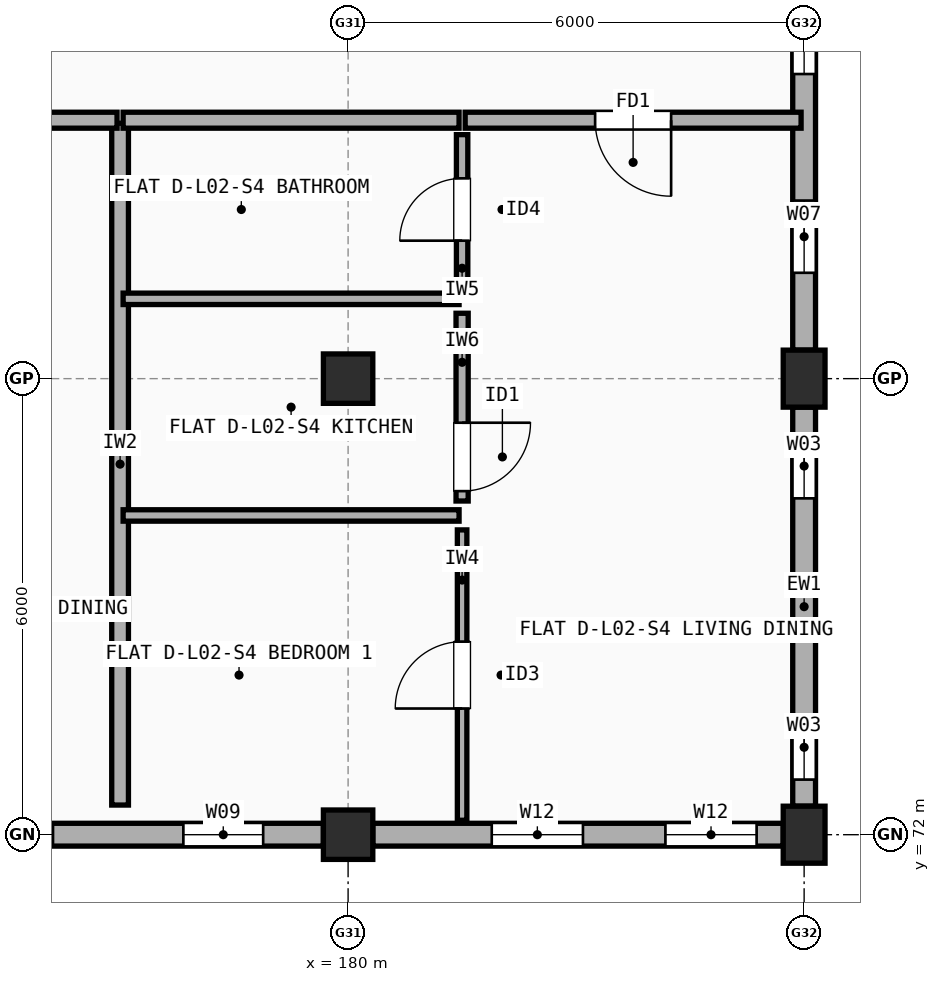
"""IFC4 building model, lengths in metres.
Left out: names, types, materials, properties, quantities, classifications, styles, units other than length and angle.
Written with IfcOpenShell. Run it as: python <this file> out.ifc"""

import sys

from ifc_helpers import new_model, si_unit, direction, frame, frame_2d, origin, origin_2d, place, context, subcontext, project, spatial, rectangle, extrude, element, fill, save


model = new_model("IFC4")
c1 = context("Model", 3, precision=1e-05, world=origin(), true_north=direction((0.0, 1.0)))
c2 = subcontext(c1, "Body", "Model", "MODEL_VIEW")
j1 = project(units=[si_unit("LENGTHUNIT", "METRE"), si_unit("PLANEANGLEUNIT", "RADIAN")], contexts=[c1])
p1 = place(None, origin())
s1 = spatial("IfcSite", under=j1, at=p1, CompositionType="ELEMENT")
p2 = place(p1, origin())
s2 = spatial("IfcBuilding", under=s1, at=p2, CompositionType="ELEMENT")
p3 = place(p2, frame((0.0, 0.0, 7.7)))
s3 = spatial("IfcBuildingStorey", under=s2, at=p3, CompositionType="ELEMENT", Elevation=7.7)
for number, where, z_axis, x_axis in (
    (1, (180.0, 72.0, 0.0), (0.0, 0.0, 1.0), (1.0, 0.0, 0.0)),
    (2, (180.0, 78.0, 0.0), (0.0, 0.0, 1.0), (1.0, 0.0, 0.0)),
):
    element("IfcColumn", number, at=place(p3, frame(where, z_axis=z_axis, x_axis=x_axis)), inside=s3, PredefinedType="COLUMN", context=c2, shape_type="SweptSolid", body=[
        extrude(rectangle(XDim=0.65, YDim=0.65, at=origin_2d()), origin(), (0.0, 0.0, 1.0), 2.955),
    ])
for number, where, z_axis, x_axis in (
    (3, (186.0, 72.0, 0.0), (0.0, 0.0, 1.0), (1.0, 0.0, 0.0)),
    (4, (186.0, 78.0, 0.0), (0.0, 0.0, 1.0), (1.0, 0.0, 0.0)),
):
    element("IfcColumn", number, at=place(p3, frame(where, z_axis=z_axis, x_axis=x_axis)), inside=s3, PredefinedType="COLUMN", context=c2, shape_type="SweptSolid", body=[
        extrude(rectangle(XDim=0.55, YDim=0.75, at=origin_2d()), origin(), (0.0, 0.0, 1.0), 2.955),
    ])
p4 = place(p3, frame((174.325, 72.0, 0.0), z_axis=(0.0, 0.0, 1.0), x_axis=(1.0, 0.0, 0.0)))
e5 = element("IfcWall", 5, at=p4, inside=s3, PredefinedType="STANDARD", context=c2, shape_type="SweptSolid", body=[
    extrude(rectangle(XDim=5.35, YDim=0.3, at=frame_2d((2.675, 0.0))), origin(), (0.0, 0.0, 1.0), 2.437),
])
p5 = place(p4, frame((0.843, 0.0, 0.9)))
e6 = element("IfcOpeningElement", 6, at=p5, cuts=e5, PredefinedType="OPENING", context=c2, shape_type="SweptSolid", body=[
    extrude(rectangle(XDim=0.95, YDim=1.35, at=frame_2d((0.475, 0.675))), frame((0.0, 0.16, 0.0), z_axis=(0.0, -1.0, 0.0), x_axis=(1.0, 0.0, 0.0)), (0.0, 0.0, 1.0), 0.32),
])
p6 = place(p4, frame((3.508, 0.0, 0.9)))
e7 = element("IfcOpeningElement", 7, at=p6, cuts=e5, PredefinedType="OPENING", context=c2, shape_type="SweptSolid", body=[
    extrude(rectangle(XDim=1.05, YDim=1.35, at=frame_2d((0.525, 0.675))), frame((0.0, 0.16, 0.0), z_axis=(0.0, -1.0, 0.0), x_axis=(1.0, 0.0, 0.0)), (0.0, 0.0, 1.0), 0.32),
])
p7 = place(p3, frame((180.325, 72.0, 0.0), z_axis=(0.0, 0.0, 1.0), x_axis=(1.0, 0.0, 0.0)))
e8 = element("IfcWall", 8, at=p7, inside=s3, PredefinedType="STANDARD", context=c2, shape_type="SweptSolid", body=[
    extrude(rectangle(XDim=5.4, YDim=0.3, at=frame_2d((2.7, 0.0))), origin(), (0.0, 0.0, 1.0), 2.437),
])
p8 = place(p7, frame((1.565, 0.0, 0.9)))
e9 = element("IfcOpeningElement", 9, at=p8, cuts=e8, PredefinedType="OPENING", context=c2, shape_type="SweptSolid", body=[
    extrude(rectangle(XDim=1.2, YDim=1.35, at=frame_2d((0.6, 0.675))), frame((0.0, 0.16, 0.0), z_axis=(0.0, -1.0, 0.0), x_axis=(1.0, 0.0, 0.0)), (0.0, 0.0, 1.0), 0.32),
])
p9 = place(p7, frame((3.85, 0.0, 0.9)))
e10 = element("IfcOpeningElement", 10, at=p9, cuts=e8, PredefinedType="OPENING", context=c2, shape_type="SweptSolid", body=[
    extrude(rectangle(XDim=1.2, YDim=1.35, at=frame_2d((0.6, 0.675))), frame((0.0, 0.16, 0.0), z_axis=(0.0, -1.0, 0.0), x_axis=(1.0, 0.0, 0.0)), (0.0, 0.0, 1.0), 0.32),
])
p10 = place(p3, frame((186.0, 72.375, 0.0), z_axis=(0.0, 0.0, 1.0), x_axis=(0.0, 1.0, 0.0)))
e11 = element("IfcWall", 11, at=p10, inside=s3, PredefinedType="STANDARD", context=c2, shape_type="SweptSolid", body=[
    extrude(rectangle(XDim=5.25, YDim=0.3, at=frame_2d((2.625, 0.0))), origin(), (0.0, 0.0, 1.0), 2.437),
])
p11 = place(p10, frame((0.35, 0.0, 0.9)))
e12 = element("IfcOpeningElement", 12, at=p11, cuts=e11, PredefinedType="OPENING", context=c2, shape_type="SweptSolid", body=[
    extrude(rectangle(XDim=0.85, YDim=1.25, at=frame_2d((0.425, 0.625))), frame((0.0, 0.16, 0.0), z_axis=(0.0, -1.0, 0.0), x_axis=(1.0, 0.0, 0.0)), (0.0, 0.0, 1.0), 0.32),
])
p12 = place(p10, frame((4.05, 0.0, 0.9)))
e13 = element("IfcOpeningElement", 13, at=p12, cuts=e11, PredefinedType="OPENING", context=c2, shape_type="SweptSolid", body=[
    extrude(rectangle(XDim=0.85, YDim=1.25, at=frame_2d((0.425, 0.625))), frame((0.0, 0.16, 0.0), z_axis=(0.0, -1.0, 0.0), x_axis=(1.0, 0.0, 0.0)), (0.0, 0.0, 1.0), 0.32),
])
p13 = place(p3, frame((186.0, 78.375, 0.0), z_axis=(0.0, 0.0, 1.0), x_axis=(0.0, 1.0, 0.0)))
e14 = element("IfcWall", 14, at=p13, inside=s3, PredefinedType="STANDARD", context=c2, shape_type="SweptSolid", body=[
    extrude(rectangle(XDim=5.25, YDim=0.3, at=frame_2d((2.625, 0.0))), origin(), (0.0, 0.0, 1.0), 2.437),
])
p14 = place(p13, frame((1.018, 0.0, 0.9)))
e15 = element("IfcOpeningElement", 15, at=p14, cuts=e14, PredefinedType="OPENING", context=c2, shape_type="SweptSolid", body=[
    extrude(rectangle(XDim=0.95, YDim=1.35, at=frame_2d((0.475, 0.675))), frame((0.0, 0.16, 0.0), z_axis=(0.0, -1.0, 0.0), x_axis=(1.0, 0.0, 0.0)), (0.0, 0.0, 1.0), 0.32),
])
p15 = place(p13, frame((3.633, 0.0, 0.9)))
e16 = element("IfcOpeningElement", 16, at=p15, cuts=e14, PredefinedType="OPENING", context=c2, shape_type="SweptSolid", body=[
    extrude(rectangle(XDim=1.05, YDim=1.35, at=frame_2d((0.525, 0.675))), frame((0.0, 0.16, 0.0), z_axis=(0.0, -1.0, 0.0), x_axis=(1.0, 0.0, 0.0)), (0.0, 0.0, 1.0), 0.32),
])
p16 = place(p3, frame((177.0, 72.39, 0.0), z_axis=(0.0, 0.0, 1.0), x_axis=(0.0, 1.0, 0.0)))
e17 = element("IfcWall", 17, at=p16, inside=s3, PredefinedType="SOLIDWALL", context=c2, shape_type="SweptSolid", body=[
    extrude(rectangle(XDim=8.97, YDim=0.22, at=frame_2d((4.485, 0.0))), origin(), (0.0, 0.0, 1.0), 2.437),
])
p17 = place(p3, frame((172.54, 81.4, 0.0), z_axis=(0.0, 0.0, 1.0), x_axis=(1.0, 0.0, 0.0)))
e18 = element("IfcWall", 18, at=p17, inside=s3, PredefinedType="SOLIDWALL", context=c2, shape_type="SweptSolid", body=[
    extrude(rectangle(XDim=4.42, YDim=0.21, at=frame_2d((2.21, 0.0))), origin(), (0.0, 0.0, 1.0), 2.337),
])
p18 = place(p17, frame((1.685, 0.0, 0.0)))
e19 = element("IfcOpeningElement", 19, at=p18, cuts=e18, PredefinedType="OPENING", context=c2, shape_type="SweptSolid", body=[
    extrude(rectangle(XDim=1.05, YDim=2.15, at=frame_2d((0.525, 1.075))), frame((0.0, 0.115, 0.0), z_axis=(0.0, -1.0, 0.0), x_axis=(1.0, 0.0, 0.0)), (0.0, 0.0, 1.0), 0.23),
])
p19 = place(p3, frame((177.04, 81.4, 0.0), z_axis=(0.0, 0.0, 1.0), x_axis=(1.0, 0.0, 0.0)))
e20 = element("IfcWall", 20, at=p19, inside=s3, PredefinedType="SOLIDWALL", context=c2, shape_type="SweptSolid", body=[
    extrude(rectangle(XDim=4.42, YDim=0.21, at=frame_2d((2.21, 0.0))), origin(), (0.0, 0.0, 1.0), 2.337),
])
p20 = place(p3, frame((181.54, 81.4, 0.0), z_axis=(0.0, 0.0, 1.0), x_axis=(1.0, 0.0, 0.0)))
e21 = element("IfcWall", 21, at=p20, inside=s3, PredefinedType="SOLIDWALL", context=c2, shape_type="SweptSolid", body=[
    extrude(rectangle(XDim=4.42, YDim=0.21, at=frame_2d((2.21, 0.0))), origin(), (0.0, 0.0, 1.0), 2.437),
])
p21 = place(p20, frame((1.71, 0.0, 0.0)))
e22 = element("IfcOpeningElement", 22, at=p21, cuts=e21, PredefinedType="OPENING", context=c2, shape_type="SweptSolid", body=[
    extrude(rectangle(XDim=1.0, YDim=2.15, at=frame_2d((0.5, 1.075))), frame((0.0, 0.115, 0.0), z_axis=(0.0, -1.0, 0.0), x_axis=(1.0, 0.0, 0.0)), (0.0, 0.0, 1.0), 0.23),
])
p22 = place(p3, frame((181.5, 72.19, 0.0), z_axis=(0.0, 0.0, 1.0), x_axis=(0.0, 1.0, 0.0)))
e23 = element("IfcWall", 23, at=p22, inside=s3, PredefinedType="PARTITIONING", context=c2, shape_type="SweptSolid", body=[
    extrude(rectangle(XDim=3.82, YDim=0.125, at=frame_2d((1.91, 0.0))), origin(), (0.0, 0.0, 1.0), 2.955),
])
p23 = place(p22, frame((1.47, 0.0, 0.0)))
e24 = element("IfcOpeningElement", 24, at=p23, cuts=e23, PredefinedType="OPENING", context=c2, shape_type="SweptSolid", body=[
    extrude(rectangle(XDim=0.88, YDim=2.1, at=frame_2d((0.44, 1.05))), frame((0.0, 0.073, 0.0), z_axis=(0.0, -1.0, 0.0), x_axis=(1.0, 0.0, 0.0)), (0.0, 0.0, 1.0), 0.145),
])
p24 = place(p3, frame((181.5, 76.39, 0.0), z_axis=(0.0, 0.0, 1.0), x_axis=(0.0, 1.0, 0.0)))
e25 = element("IfcWall", 25, at=p24, inside=s3, PredefinedType="PLUMBINGWALL", context=c2, shape_type="SweptSolid", body=[
    extrude(rectangle(XDim=2.47, YDim=0.16, at=frame_2d((1.235, 0.0))), origin(), (0.0, 0.0, 1.0), 2.437),
])
p25 = place(p24, frame((0.13, 0.0, 0.0)))
e26 = element("IfcOpeningElement", 26, at=p25, cuts=e25, PredefinedType="OPENING", context=c2, shape_type="SweptSolid", body=[
    extrude(rectangle(XDim=0.9, YDim=2.1, at=frame_2d((0.45, 1.05))), frame((0.0, 0.09, 0.0), z_axis=(0.0, -1.0, 0.0), x_axis=(1.0, 0.0, 0.0)), (0.0, 0.0, 1.0), 0.18),
])
p26 = place(p3, frame((181.5, 79.24, 0.0), z_axis=(0.0, 0.0, 1.0), x_axis=(0.0, 1.0, 0.0)))
e27 = element("IfcWall", 27, at=p26, inside=s3, PredefinedType="PARTITIONING", context=c2, shape_type="SweptSolid", body=[
    extrude(rectangle(XDim=1.97, YDim=0.15, at=frame_2d((0.985, 0.0))), origin(), (0.0, 0.0, 1.0), 2.955),
])
p27 = place(p26, frame((0.575, 0.0, 0.0)))
e28 = element("IfcOpeningElement", 28, at=p27, cuts=e27, PredefinedType="OPENING", context=c2, shape_type="SweptSolid", body=[
    extrude(rectangle(XDim=0.82, YDim=2.08, at=frame_2d((0.41, 1.04))), frame((0.0, 0.085, 0.0), z_axis=(0.0, -1.0, 0.0), x_axis=(1.0, 0.0, 0.0)), (0.0, 0.0, 1.0), 0.17),
])
for number, where, z_axis, x_axis in (
    (29, (177.04, 76.2, 0.0), (0.0, 0.0, 1.0), (1.0, 0.0, 0.0)),
    (30, (177.04, 79.05, 0.0), (0.0, 0.0, 1.0), (1.0, 0.0, 0.0)),
):
    element("IfcWall", number, at=place(p3, frame(where, z_axis=z_axis, x_axis=x_axis)), inside=s3, PredefinedType="PARTITIONING", context=c2, shape_type="SweptSolid", body=[
        extrude(rectangle(XDim=4.42, YDim=0.15, at=frame_2d((2.21, 0.0))), origin(), (0.0, 0.0, 1.0), 2.337),
    ])
p28 = place(p5, origin())
e31 = element("IfcWindow", 31, at=p28, inside=s3, PartitioningType="SINGLE_PANEL", PredefinedType="WINDOW", context=c2, shape_type="SweptSolid", body=[
    extrude(rectangle(XDim=0.95, YDim=1.35, at=frame_2d((0.475, 0.675))), frame((0.0, 0.03, 0.0), z_axis=(0.0, -1.0, 0.0), x_axis=(1.0, 0.0, 0.0)), (0.0, 0.0, 1.0), 0.06),
])
fill(e6, e31)
p29 = place(p6, origin())
e32 = element("IfcWindow", 32, at=p29, inside=s3, PartitioningType="SINGLE_PANEL", PredefinedType="WINDOW", context=c2, shape_type="SweptSolid", body=[
    extrude(rectangle(XDim=1.05, YDim=1.35, at=frame_2d((0.525, 0.675))), frame((0.0, 0.03, 0.0), z_axis=(0.0, -1.0, 0.0), x_axis=(1.0, 0.0, 0.0)), (0.0, 0.0, 1.0), 0.06),
])
fill(e7, e32)
p30 = place(p8, origin())
e33 = element("IfcWindow", 33, at=p30, inside=s3, PartitioningType="SINGLE_PANEL", PredefinedType="WINDOW", context=c2, shape_type="SweptSolid", body=[
    extrude(rectangle(XDim=1.2, YDim=1.35, at=frame_2d((0.6, 0.675))), frame((0.0, 0.03, 0.0), z_axis=(0.0, -1.0, 0.0), x_axis=(1.0, 0.0, 0.0)), (0.0, 0.0, 1.0), 0.06),
])
fill(e9, e33)
p31 = place(p9, origin())
e34 = element("IfcWindow", 34, at=p31, inside=s3, PartitioningType="SINGLE_PANEL", PredefinedType="WINDOW", context=c2, shape_type="SweptSolid", body=[
    extrude(rectangle(XDim=1.2, YDim=1.35, at=frame_2d((0.6, 0.675))), frame((0.0, 0.03, 0.0), z_axis=(0.0, -1.0, 0.0), x_axis=(1.0, 0.0, 0.0)), (0.0, 0.0, 1.0), 0.06),
])
fill(e10, e34)
p32 = place(p11, origin())
e35 = element("IfcWindow", 35, at=p32, inside=s3, PartitioningType="SINGLE_PANEL", PredefinedType="WINDOW", context=c2, shape_type="SweptSolid", body=[
    extrude(rectangle(XDim=0.85, YDim=1.25, at=frame_2d((0.425, 0.625))), frame((0.0, 0.03, 0.0), z_axis=(0.0, -1.0, 0.0), x_axis=(1.0, 0.0, 0.0)), (0.0, 0.0, 1.0), 0.06),
])
fill(e12, e35)
p33 = place(p12, origin())
e36 = element("IfcWindow", 36, at=p33, inside=s3, PartitioningType="SINGLE_PANEL", PredefinedType="WINDOW", context=c2, shape_type="SweptSolid", body=[
    extrude(rectangle(XDim=0.85, YDim=1.25, at=frame_2d((0.425, 0.625))), frame((0.0, 0.03, 0.0), z_axis=(0.0, -1.0, 0.0), x_axis=(1.0, 0.0, 0.0)), (0.0, 0.0, 1.0), 0.06),
])
fill(e13, e36)
p34 = place(p14, origin())
e37 = element("IfcWindow", 37, at=p34, inside=s3, PartitioningType="SINGLE_PANEL", PredefinedType="WINDOW", context=c2, shape_type="SweptSolid", body=[
    extrude(rectangle(XDim=0.95, YDim=1.35, at=frame_2d((0.475, 0.675))), frame((0.0, 0.03, 0.0), z_axis=(0.0, -1.0, 0.0), x_axis=(1.0, 0.0, 0.0)), (0.0, 0.0, 1.0), 0.06),
])
fill(e15, e37)
p35 = place(p15, origin())
e38 = element("IfcWindow", 38, at=p35, inside=s3, PartitioningType="SINGLE_PANEL", PredefinedType="WINDOW", context=c2, shape_type="SweptSolid", body=[
    extrude(rectangle(XDim=1.05, YDim=1.35, at=frame_2d((0.525, 0.675))), frame((0.0, 0.03, 0.0), z_axis=(0.0, -1.0, 0.0), x_axis=(1.0, 0.0, 0.0)), (0.0, 0.0, 1.0), 0.06),
])
fill(e16, e38)
p36 = place(p21, origin())
e39 = element("IfcDoor", 39, at=p36, inside=s3, OperationType="SINGLE_SWING_RIGHT", PredefinedType="DOOR", context=c2, shape_type="SweptSolid", body=[
    extrude(rectangle(XDim=1.0, YDim=2.15, at=frame_2d((0.5, 1.075))), frame((0.0, 0.025, 0.0), z_axis=(0.0, -1.0, 0.0), x_axis=(1.0, 0.0, 0.0)), (0.0, 0.0, 1.0), 0.05),
])
fill(e22, e39)
p37 = place(p23, origin())
e40 = element("IfcDoor", 40, at=p37, inside=s3, OperationType="SINGLE_SWING_LEFT", PredefinedType="DOOR", context=c2, shape_type="SweptSolid", body=[
    extrude(rectangle(XDim=0.88, YDim=2.1, at=frame_2d((0.44, 1.05))), frame((0.0, 0.025, 0.0), z_axis=(0.0, -1.0, 0.0), x_axis=(1.0, 0.0, 0.0)), (0.0, 0.0, 1.0), 0.05),
])
fill(e24, e40)
p38 = place(p25, origin())
e41 = element("IfcDoor", 41, at=p38, inside=s3, OperationType="SINGLE_SWING_RIGHT", PredefinedType="DOOR", context=c2, shape_type="SweptSolid", body=[
    extrude(rectangle(XDim=0.9, YDim=2.1, at=frame_2d((0.45, 1.05))), frame((0.0, 0.025, 0.0), z_axis=(0.0, -1.0, 0.0), x_axis=(1.0, 0.0, 0.0)), (0.0, 0.0, 1.0), 0.05),
])
fill(e26, e41)
p39 = place(p27, origin())
e42 = element("IfcDoor", 42, at=p39, inside=s3, OperationType="SINGLE_SWING_LEFT", PredefinedType="DOOR", context=c2, shape_type="SweptSolid", body=[
    extrude(rectangle(XDim=0.82, YDim=2.08, at=frame_2d((0.41, 1.04))), frame((0.0, 0.025, 0.0), z_axis=(0.0, -1.0, 0.0), x_axis=(1.0, 0.0, 0.0)), (0.0, 0.0, 1.0), 0.05),
])
fill(e28, e42)
save(model, sys.argv[1])
